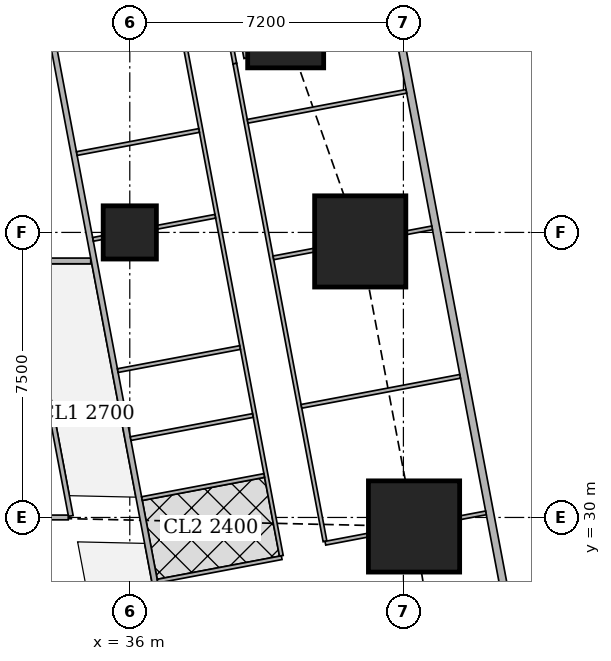
"""IFC4 building model, lengths in metres.
Left out: names, types, materials, properties, quantities, classifications, styles, units other than length and angle.
Written with IfcOpenShell. Run it as: python <this file> out.ifc"""

import sys

from ifc_helpers import new_model, si_unit, direction, frame, frame_2d, origin, origin_2d, place, context, subcontext, project, spatial, rectangle, extrude, element, fill, save


model = new_model("IFC4")
c1 = context("Model", 3, precision=1e-05, world=origin(), true_north=direction((0.0, 1.0)))
c2 = subcontext(c1, "Body", "Model", "MODEL_VIEW")
j1 = project(units=[si_unit("LENGTHUNIT", "METRE"), si_unit("PLANEANGLEUNIT", "RADIAN")], contexts=[c1])
p1 = place(None, origin())
s1 = spatial("IfcSite", under=j1, at=p1, CompositionType="ELEMENT")
p2 = place(p1, origin())
s2 = spatial("IfcBuilding", under=s1, at=p2, CompositionType="ELEMENT")
p3 = place(p2, frame((0.0, 0.0, 193.7)))
s3 = spatial("IfcBuildingStorey", under=s2, at=p3, CompositionType="ELEMENT", Elevation=193.7)
p4 = place(p3, frame((43.48, 29.763, 0.0), z_axis=(0.0, 0.0, 1.0), x_axis=(1.0, 0.0, 0.0)))
e1 = element("IfcColumn", 1, at=p4, inside=s3, PredefinedType="COLUMN", context=c2, shape_type="SweptSolid", body=[
    extrude(rectangle(XDim=2.4, YDim=2.4, at=origin_2d()), origin(), (0.0, 0.0, 1.0), 3.75),
])
p5 = place(p3, frame((36.0, 37.5, 0.0), z_axis=(0.0, 0.0, 1.0), x_axis=(1.0, 0.0, 0.0)))
e2 = element("IfcColumn", 2, at=p5, inside=s3, PredefinedType="COLUMN", context=c2, shape_type="SweptSolid", body=[
    extrude(rectangle(XDim=1.4, YDim=1.4, at=origin_2d()), origin(), (0.0, 0.0, 1.0), 3.75),
])
p6 = place(p3, frame((42.064, 37.263, 0.0), z_axis=(0.0, 0.0, 1.0), x_axis=(1.0, 0.0, 0.0)))
e3 = element("IfcColumn", 3, at=p6, inside=s3, PredefinedType="COLUMN", context=c2, shape_type="SweptSolid", body=[
    extrude(rectangle(XDim=2.4, YDim=2.4, at=origin_2d()), origin(), (0.0, 0.0, 1.0), 3.75),
])
p7 = place(p3, frame((40.102, 42.83, 0.0), z_axis=(0.0, 0.0, 1.0), x_axis=(1.0, 0.0, 0.0)))
e4 = element("IfcColumn", 4, at=p7, inside=s3, PredefinedType="COLUMN", context=c2, shape_type="SweptSolid", body=[
    extrude(rectangle(XDim=2.0, YDim=2.0, at=origin_2d()), origin(), (0.0, 0.0, 1.0), 3.75),
])
p8 = place(p3, frame((50.653, 2.703, 0.0), z_axis=(0.0, 0.0, 1.0), x_axis=(-0.185612026696, 0.982623109613, 0.0)))
e5 = element("IfcWall", 5, at=p8, inside=s3, PredefinedType="SOLIDWALL", context=c2, shape_type="SweptSolid", body=[
    extrude(rectangle(XDim=41.393, YDim=0.2, at=frame_2d((20.697, 0.0))), origin(), (0.0, 0.0, 1.0), 3.5),
])
p9 = place(p8, frame((1.633, 0.0, 0.9)))
e6 = element("IfcOpeningElement", 6, at=p9, cuts=e5, PredefinedType="OPENING", context=c2, shape_type="SweptSolid", body=[
    extrude(rectangle(XDim=1.8, YDim=1.5, at=frame_2d((0.9, 0.75))), frame((0.0, 0.11, 0.0), z_axis=(0.0, -1.0, 0.0), x_axis=(1.0, 0.0, 0.0)), (0.0, 0.0, 1.0), 0.22),
])
p10 = place(p8, frame((6.032, 0.0, 0.9)))
e7 = element("IfcOpeningElement", 7, at=p10, cuts=e5, PredefinedType="OPENING", context=c2, shape_type="SweptSolid", body=[
    extrude(rectangle(XDim=1.8, YDim=1.5, at=frame_2d((0.9, 0.75))), frame((0.0, 0.11, 0.0), z_axis=(0.0, -1.0, 0.0), x_axis=(1.0, 0.0, 0.0)), (0.0, 0.0, 1.0), 0.22),
])
p11 = place(p8, frame((9.848, 0.0, 0.9)))
e8 = element("IfcOpeningElement", 8, at=p11, cuts=e5, PredefinedType="OPENING", context=c2, shape_type="SweptSolid", body=[
    extrude(rectangle(XDim=1.8, YDim=1.5, at=frame_2d((0.9, 0.75))), frame((0.0, 0.11, 0.0), z_axis=(0.0, -1.0, 0.0), x_axis=(1.0, 0.0, 0.0)), (0.0, 0.0, 1.0), 0.22),
])
p12 = place(p8, frame((13.664, 0.0, 0.9)))
e9 = element("IfcOpeningElement", 9, at=p12, cuts=e5, PredefinedType="OPENING", context=c2, shape_type="SweptSolid", body=[
    extrude(rectangle(XDim=1.8, YDim=1.5, at=frame_2d((0.9, 0.75))), frame((0.0, 0.11, 0.0), z_axis=(0.0, -1.0, 0.0), x_axis=(1.0, 0.0, 0.0)), (0.0, 0.0, 1.0), 0.22),
])
p13 = place(p8, frame((17.481, 0.0, 0.9)))
e10 = element("IfcOpeningElement", 10, at=p13, cuts=e5, PredefinedType="OPENING", context=c2, shape_type="SweptSolid", body=[
    extrude(rectangle(XDim=1.8, YDim=1.5, at=frame_2d((0.9, 0.75))), frame((0.0, 0.11, 0.0), z_axis=(0.0, -1.0, 0.0), x_axis=(1.0, 0.0, 0.0)), (0.0, 0.0, 1.0), 0.22),
])
p14 = place(p8, frame((21.297, 0.0, 0.9)))
e11 = element("IfcOpeningElement", 11, at=p14, cuts=e5, PredefinedType="OPENING", context=c2, shape_type="SweptSolid", body=[
    extrude(rectangle(XDim=1.8, YDim=1.5, at=frame_2d((0.9, 0.75))), frame((0.0, 0.11, 0.0), z_axis=(0.0, -1.0, 0.0), x_axis=(1.0, 0.0, 0.0)), (0.0, 0.0, 1.0), 0.22),
])
p15 = place(p8, frame((25.113, 0.0, 0.9)))
e12 = element("IfcOpeningElement", 12, at=p15, cuts=e5, PredefinedType="OPENING", context=c2, shape_type="SweptSolid", body=[
    extrude(rectangle(XDim=1.8, YDim=1.5, at=frame_2d((0.9, 0.75))), frame((0.0, 0.11, 0.0), z_axis=(0.0, -1.0, 0.0), x_axis=(1.0, 0.0, 0.0)), (0.0, 0.0, 1.0), 0.22),
])
p16 = place(p8, frame((28.93, 0.0, 0.9)))
e13 = element("IfcOpeningElement", 13, at=p16, cuts=e5, PredefinedType="OPENING", context=c2, shape_type="SweptSolid", body=[
    extrude(rectangle(XDim=1.8, YDim=1.5, at=frame_2d((0.9, 0.75))), frame((0.0, 0.11, 0.0), z_axis=(0.0, -1.0, 0.0), x_axis=(1.0, 0.0, 0.0)), (0.0, 0.0, 1.0), 0.22),
])
p17 = place(p8, frame((32.746, 0.0, 0.9)))
e14 = element("IfcOpeningElement", 14, at=p17, cuts=e5, PredefinedType="OPENING", context=c2, shape_type="SweptSolid", body=[
    extrude(rectangle(XDim=1.8, YDim=1.5, at=frame_2d((0.9, 0.75))), frame((0.0, 0.11, 0.0), z_axis=(0.0, -1.0, 0.0), x_axis=(1.0, 0.0, 0.0)), (0.0, 0.0, 1.0), 0.22),
])
p18 = place(p8, frame((36.481, 0.0, 0.9)))
e15 = element("IfcOpeningElement", 15, at=p18, cuts=e5, PredefinedType="OPENING", context=c2, shape_type="SweptSolid", body=[
    extrude(rectangle(XDim=1.8, YDim=1.5, at=frame_2d((0.9, 0.75))), frame((0.0, 0.11, 0.0), z_axis=(0.0, -1.0, 0.0), x_axis=(1.0, 0.0, 0.0)), (0.0, 0.0, 1.0), 0.22),
])
p19 = place(p3, frame((29.501, 36.75, 0.0), z_axis=(0.0, 0.0, 1.0), x_axis=(1.0, 0.0, 0.0)))
e16 = element("IfcWall", 16, at=p19, inside=s3, PredefinedType="SOLIDWALL", context=c2, shape_type="SweptSolid", body=[
    extrude(rectangle(XDim=5.471, YDim=0.15, at=frame_2d((2.735, 0.0))), origin(), (0.0, 0.0, 1.0), 3.5),
])
p20 = place(p19, frame((2.945, 0.0, 0.0)))
e17 = element("IfcOpeningElement", 17, at=p20, cuts=e16, PredefinedType="OPENING", context=c2, shape_type="SweptSolid", body=[
    extrude(rectangle(XDim=1.0, YDim=2.1, at=frame_2d((0.5, 1.05))), frame((0.0, 0.085, 0.0), z_axis=(0.0, -1.0, 0.0), x_axis=(1.0, 0.0, 0.0)), (0.0, 0.0, 1.0), 0.17),
])
p21 = place(p3, frame((33.933, 42.73, 0.0), z_axis=(0.0, 0.0, 1.0), x_axis=(0.185595417643, -0.982626246825, 0.0)))
e18 = element("IfcWall", 18, at=p21, inside=s3, PredefinedType="SOLIDWALL", context=c2, shape_type="SweptSolid", body=[
    extrude(rectangle(XDim=41.051, YDim=0.15, at=frame_2d((20.525, 0.0))), origin(), (0.0, 0.0, 1.0), 2.5),
])
p22 = place(p21, frame((16.082, 0.0, 0.0)))
e19 = element("IfcOpeningElement", 19, at=p22, cuts=e18, PredefinedType="OPENING", context=c2, shape_type="SweptSolid", body=[
    extrude(rectangle(XDim=1.0, YDim=2.1, at=frame_2d((0.5, 1.05))), frame((0.0, 0.085, 0.0), z_axis=(0.0, -1.0, 0.0), x_axis=(1.0, 0.0, 0.0)), (0.0, 0.0, 1.0), 0.17),
])
p23 = place(p21, frame((19.898, 0.0, 0.0)))
e20 = element("IfcOpeningElement", 20, at=p23, cuts=e18, PredefinedType="OPENING", context=c2, shape_type="SweptSolid", body=[
    extrude(rectangle(XDim=1.0, YDim=2.1, at=frame_2d((0.5, 1.05))), frame((0.0, 0.085, 0.0), z_axis=(0.0, -1.0, 0.0), x_axis=(1.0, 0.0, 0.0)), (0.0, 0.0, 1.0), 0.17),
])
p24 = place(p21, frame((30.862, 0.0, 0.0)))
e21 = element("IfcOpeningElement", 21, at=p24, cuts=e18, PredefinedType="OPENING", context=c2, shape_type="SweptSolid", body=[
    extrude(rectangle(XDim=1.0, YDim=2.1, at=frame_2d((0.5, 1.05))), frame((0.0, 0.085, 0.0), z_axis=(0.0, -1.0, 0.0), x_axis=(1.0, 0.0, 0.0)), (0.0, 0.0, 1.0), 0.17),
])
p25 = place(p3, frame((39.054, 42.085, 0.0), z_axis=(0.0, 0.0, 1.0), x_axis=(-0.185791584218, 0.982589175207, 0.0)))
e22 = element("IfcWall", 22, at=p25, inside=s3, PredefinedType="PARTITIONING", context=c2, shape_type="SweptSolid", body=[
    extrude(rectangle(XDim=3.628, YDim=0.1, at=frame_2d((1.814, 0.0))), origin(), (0.0, 0.0, 1.0), 2.05),
])
p26 = place(p3, frame((38.256, 44.628, 0.0), z_axis=(0.0, 0.0, 1.0), x_axis=(0.185700639943, -0.982606366927, 0.0)))
e23 = element("IfcWall", 23, at=p26, inside=s3, PredefinedType="PARTITIONING", context=c2, shape_type="SweptSolid", body=[
    extrude(rectangle(XDim=2.735, YDim=0.1, at=frame_2d((1.367, 0.0))), origin(), (0.0, 0.0, 1.0), 2.05),
])
p27 = place(p3, frame((38.764, 41.941, 0.0), z_axis=(0.0, 0.0, 1.0), x_axis=(0.185512176227, -0.982641965556, 0.0)))
e24 = element("IfcWall", 24, at=p27, inside=s3, PredefinedType="PARTITIONING", context=c2, shape_type="SweptSolid", body=[
    extrude(rectangle(XDim=12.792, YDim=0.1, at=frame_2d((6.396, 0.0))), origin(), (0.0, 0.0, 1.0), 2.5),
])
p28 = place(p27, frame((11.35, 0.0, 0.0)))
e25 = element("IfcOpeningElement", 25, at=p28, cuts=e24, PredefinedType="OPENING", context=c2, shape_type="SweptSolid", body=[
    extrude(rectangle(XDim=0.9, YDim=2.1, at=frame_2d((0.45, 1.05))), frame((0.0, 0.06, 0.0), z_axis=(0.0, -1.0, 0.0), x_axis=(1.0, 0.0, 0.0)), (0.0, 0.0, 1.0), 0.12),
])
p29 = place(p27, frame((8.085, 0.0, 0.0)))
e26 = element("IfcOpeningElement", 26, at=p29, cuts=e24, PredefinedType="OPENING", context=c2, shape_type="SweptSolid", body=[
    extrude(rectangle(XDim=0.9, YDim=2.1, at=frame_2d((0.45, 1.05))), frame((0.0, 0.06, 0.0), z_axis=(0.0, -1.0, 0.0), x_axis=(1.0, 0.0, 0.0)), (0.0, 0.0, 1.0), 0.12),
])
p30 = place(p27, frame((3.7, 0.0, 0.0)))
e27 = element("IfcOpeningElement", 27, at=p30, cuts=e24, PredefinedType="OPENING", context=c2, shape_type="SweptSolid", body=[
    extrude(rectangle(XDim=0.9, YDim=2.1, at=frame_2d((0.45, 1.05))), frame((0.0, 0.06, 0.0), z_axis=(0.0, -1.0, 0.0), x_axis=(1.0, 0.0, 0.0)), (0.0, 0.0, 1.0), 0.12),
])
p31 = place(p3, frame((37.473, 42.309, 0.0), z_axis=(0.0, 0.0, 1.0), x_axis=(0.185570636839, -0.982630927024, 0.0)))
e28 = element("IfcWall", 28, at=p31, inside=s3, PredefinedType="PARTITIONING", context=c2, shape_type="SweptSolid", body=[
    extrude(rectangle(XDim=13.553, YDim=0.1, at=frame_2d((6.777, 0.0))), origin(), (0.0, 0.0, 1.0), 2.5),
])
p32 = place(p31, frame((12.049, 0.0, 0.0)))
e29 = element("IfcOpeningElement", 29, at=p32, cuts=e28, PredefinedType="OPENING", context=c2, shape_type="SweptSolid", body=[
    extrude(rectangle(XDim=0.9, YDim=2.1, at=frame_2d((0.45, 1.05))), frame((0.0, 0.06, 0.0), z_axis=(0.0, -1.0, 0.0), x_axis=(1.0, 0.0, 0.0)), (0.0, 0.0, 1.0), 0.12),
])
p33 = place(p31, frame((8.427, 0.0, 0.0)))
e30 = element("IfcOpeningElement", 30, at=p33, cuts=e28, PredefinedType="OPENING", context=c2, shape_type="SweptSolid", body=[
    extrude(rectangle(XDim=0.9, YDim=2.1, at=frame_2d((0.45, 1.05))), frame((0.0, 0.06, 0.0), z_axis=(0.0, -1.0, 0.0), x_axis=(1.0, 0.0, 0.0)), (0.0, 0.0, 1.0), 0.12),
])
p34 = place(p31, frame((2.853, 0.0, 0.0)))
e31 = element("IfcOpeningElement", 31, at=p34, cuts=e28, PredefinedType="OPENING", context=c2, shape_type="SweptSolid", body=[
    extrude(rectangle(XDim=0.9, YDim=2.1, at=frame_2d((0.45, 1.05))), frame((0.0, 0.06, 0.0), z_axis=(0.0, -1.0, 0.0), x_axis=(1.0, 0.0, 0.0)), (0.0, 0.0, 1.0), 0.12),
])
p35 = place(p31, frame((10.14, 0.0, 0.0)))
e32 = element("IfcOpeningElement", 32, at=p35, cuts=e28, PredefinedType="OPENING", context=c2, shape_type="SweptSolid", body=[
    extrude(rectangle(XDim=0.9, YDim=2.1, at=frame_2d((0.45, 1.05))), frame((0.0, 0.06, 0.0), z_axis=(0.0, -1.0, 0.0), x_axis=(1.0, 0.0, 0.0)), (0.0, 0.0, 1.0), 0.12),
])
p36 = place(p31, frame((5.759, 0.0, 0.0)))
e33 = element("IfcOpeningElement", 33, at=p36, cuts=e28, PredefinedType="OPENING", context=c2, shape_type="SweptSolid", body=[
    extrude(rectangle(XDim=0.9, YDim=2.1, at=frame_2d((0.45, 1.05))), frame((0.0, 0.06, 0.0), z_axis=(0.0, -1.0, 0.0), x_axis=(1.0, 0.0, 0.0)), (0.0, 0.0, 1.0), 0.12),
])
p37 = place(p3, frame((43.277, 41.212, 0.0), z_axis=(0.0, 0.0, 1.0), x_axis=(-0.982665405803, -0.185387972203, 0.0)))
e34 = element("IfcWall", 34, at=p37, inside=s3, PredefinedType="PARTITIONING", context=c2, shape_type="SweptSolid", body=[
    extrude(rectangle(XDim=4.25, YDim=0.1, at=frame_2d((2.125, 0.0))), origin(), (0.0, 0.0, 1.0), 2.05),
])
p38 = place(p3, frame((43.955, 37.62, 0.0), z_axis=(0.0, 0.0, 1.0), x_axis=(-0.982495415327, -0.186286765128, 0.0)))
e35 = element("IfcWall", 35, at=p38, inside=s3, PredefinedType="PARTITIONING", context=c2, shape_type="SweptSolid", body=[
    extrude(rectangle(XDim=0.693, YDim=0.1, at=frame_2d((0.347, 0.0))), origin(), (0.0, 0.0, 1.0), 3.5),
])
p39 = place(p3, frame((40.854, 37.034, 0.0), z_axis=(0.0, 0.0, 1.0), x_axis=(-0.982651678759, -0.185460718839, 0.0)))
e36 = element("IfcWall", 36, at=p39, inside=s3, PredefinedType="PARTITIONING", context=c2, shape_type="SweptSolid", body=[
    extrude(rectangle(XDim=1.094, YDim=0.1, at=frame_2d((0.547, 0.0))), origin(), (0.0, 0.0, 1.0), 3.5),
])
p40 = place(p3, frame((44.693, 33.713, 0.0), z_axis=(0.0, 0.0, 1.0), x_axis=(-0.982623519589, -0.185609856287, 0.0)))
e37 = element("IfcWall", 37, at=p40, inside=s3, PredefinedType="PARTITIONING", context=c2, shape_type="SweptSolid", body=[
    extrude(rectangle(XDim=4.25, YDim=0.1, at=frame_2d((2.125, 0.0))), origin(), (0.0, 0.0, 1.0), 2.05),
])
p41 = place(p3, frame((45.372, 30.121, 0.0), z_axis=(0.0, 0.0, 1.0), x_axis=(-0.98254419619, -0.186029305578, 0.0)))
e38 = element("IfcWall", 38, at=p41, inside=s3, PredefinedType="PARTITIONING", context=c2, shape_type="SweptSolid", body=[
    extrude(rectangle(XDim=0.694, YDim=0.1, at=frame_2d((0.347, 0.0))), origin(), (0.0, 0.0, 1.0), 3.5),
])
p42 = place(p3, frame((42.27, 29.535, 0.0), z_axis=(0.0, 0.0, 1.0), x_axis=(-0.982502700549, -0.186248338017, 0.0)))
e39 = element("IfcWall", 39, at=p42, inside=s3, PredefinedType="PARTITIONING", context=c2, shape_type="SweptSolid", body=[
    extrude(rectangle(XDim=1.143, YDim=0.1, at=frame_2d((0.572, 0.0))), origin(), (0.0, 0.0, 1.0), 2.5),
])
p43 = place(p3, frame((37.824, 40.182, 0.0), z_axis=(0.0, 0.0, 1.0), x_axis=(-0.982674977865, -0.185337227447, 0.0)))
e40 = element("IfcWall", 40, at=p43, inside=s3, PredefinedType="PARTITIONING", context=c2, shape_type="SweptSolid", body=[
    extrude(rectangle(XDim=3.275, YDim=0.1, at=frame_2d((1.637, 0.0))), origin(), (0.0, 0.0, 1.0), 3.5),
])
p44 = place(p3, frame((38.25, 37.925, 0.0), z_axis=(0.0, 0.0, 1.0), x_axis=(-0.982610209589, -0.185680305934, 0.0)))
e41 = element("IfcWall", 41, at=p44, inside=s3, PredefinedType="PARTITIONING", context=c2, shape_type="SweptSolid", body=[
    extrude(rectangle(XDim=1.567, YDim=0.1, at=frame_2d((0.784, 0.0))), origin(), (0.0, 0.0, 1.0), 3.5),
])
p45 = place(p3, frame((35.29, 37.366, 0.0), z_axis=(0.0, 0.0, 1.0), x_axis=(-0.982395465615, -0.18681313963, 0.0)))
e42 = element("IfcWall", 42, at=p45, inside=s3, PredefinedType="PARTITIONING", context=c2, shape_type="SweptSolid", body=[
    extrude(rectangle(XDim=0.263, YDim=0.1, at=frame_2d((0.131, 0.0))), origin(), (0.0, 0.0, 1.0), 3.5),
])
p46 = place(p3, frame((39.24, 32.683, 0.0), z_axis=(0.0, 0.0, 1.0), x_axis=(-0.982607026909, -0.185697147715, 0.0)))
e43 = element("IfcWall", 43, at=p46, inside=s3, PredefinedType="PARTITIONING", context=c2, shape_type="SweptSolid", body=[
    extrude(rectangle(XDim=3.275, YDim=0.1, at=frame_2d((1.637, 0.0))), origin(), (0.0, 0.0, 1.0), 3.5),
])
p47 = place(p3, frame((39.997, 28.942, 0.0), z_axis=(0.0, 0.0, 1.0), x_axis=(-0.982569883123, -0.185893584556, 0.0)))
e44 = element("IfcWall", 44, at=p47, inside=s3, PredefinedType="PARTITIONING", context=c2, shape_type="SweptSolid", body=[
    extrude(rectangle(XDim=3.324, YDim=0.1, at=frame_2d((1.662, 0.0))), origin(), (0.0, 0.0, 1.0), 3.5),
])
p48 = place(p3, frame((39.538, 31.104, 0.0), z_axis=(0.0, 0.0, 1.0), x_axis=(-0.982620626894, -0.185625169636, 0.0)))
e45 = element("IfcWall", 45, at=p48, inside=s3, PredefinedType="PARTITIONING", context=c2, shape_type="SweptSolid", body=[
    extrude(rectangle(XDim=3.275, YDim=0.1, at=frame_2d((1.637, 0.0))), origin(), (0.0, 0.0, 1.0), 2.5),
])
p49 = place(p3, frame((38.902, 34.471, 0.0), z_axis=(0.0, 0.0, 1.0), x_axis=(-0.982674977865, -0.185337227447, 0.0)))
e46 = element("IfcWall", 46, at=p49, inside=s3, PredefinedType="PARTITIONING", context=c2, shape_type="SweptSolid", body=[
    extrude(rectangle(XDim=3.275, YDim=0.1, at=frame_2d((1.637, 0.0))), origin(), (0.0, 0.0, 1.0), 3.5),
])
p50 = place(p3, frame((34.448, 30.04, 0.0), z_axis=(0.0, 0.0, 1.0), x_axis=(-0.185749459238, 0.982597139418, 0.0)))
e47 = element("IfcWall", 47, at=p50, inside=s3, PredefinedType="PARTITIONING", context=c2, shape_type="SweptSolid", body=[
    extrude(rectangle(XDim=4.883, YDim=0.125, at=frame_2d((2.441, 0.0))), origin(), (0.0, 0.0, 1.0), 2.5),
])
p51 = place(p50, frame((0.95, 0.0, 0.0)))
e48 = element("IfcOpeningElement", 48, at=p51, cuts=e47, PredefinedType="OPENING", context=c2, shape_type="SweptSolid", body=[
    extrude(rectangle(XDim=1.0, YDim=2.1, at=frame_2d((0.5, 1.05))), frame((0.0, 0.073, 0.0), z_axis=(0.0, -1.0, 0.0), x_axis=(1.0, 0.0, 0.0)), (0.0, 0.0, 1.0), 0.145),
])
p52 = place(p3, frame((34.535, 22.574, 0.0), z_axis=(0.0, 0.0, 1.0), x_axis=(-0.185576487128, 0.982629822174, 0.0)))
e49 = element("IfcWall", 49, at=p52, inside=s3, PredefinedType="PARTITIONING", context=c2, shape_type="SweptSolid", body=[
    extrude(rectangle(XDim=6.832, YDim=0.125, at=frame_2d((3.416, 0.0))), origin(), (0.0, 0.0, 1.0), 2.5),
])
p53 = place(p52, frame((3.241, 0.0, 0.0)))
e50 = element("IfcOpeningElement", 50, at=p53, cuts=e49, PredefinedType="OPENING", context=c2, shape_type="SweptSolid", body=[
    extrude(rectangle(XDim=1.0, YDim=2.1, at=frame_2d((0.5, 1.05))), frame((0.0, 0.073, 0.0), z_axis=(0.0, -1.0, 0.0), x_axis=(1.0, 0.0, 0.0)), (0.0, 0.0, 1.0), 0.145),
])
p54 = place(p3, frame((33.701, 30.0, 0.0), z_axis=(0.0, 0.0, 1.0), x_axis=(1.0, 0.0, 0.0)))
e51 = element("IfcWall", 51, at=p54, inside=s3, PredefinedType="PARTITIONING", context=c2, shape_type="SweptSolid", body=[
    extrude(rectangle(XDim=0.679, YDim=0.125, at=frame_2d((0.339, 0.0))), origin(), (0.0, 0.0, 1.0), 2.5),
])
p55 = place(p15, origin())
e52 = element("IfcWindow", 52, at=p55, inside=s3, PartitioningType="SINGLE_PANEL", PredefinedType="WINDOW", context=c2, shape_type="SweptSolid", body=[
    extrude(rectangle(XDim=1.8, YDim=1.5, at=frame_2d((0.9, 0.75))), frame((0.0, 0.03, 0.0), z_axis=(0.0, -1.0, 0.0), x_axis=(1.0, 0.0, 0.0)), (0.0, 0.0, 1.0), 0.06),
])
fill(e12, e52)
p56 = place(p16, origin())
e53 = element("IfcWindow", 53, at=p56, inside=s3, PartitioningType="SINGLE_PANEL", PredefinedType="WINDOW", context=c2, shape_type="SweptSolid", body=[
    extrude(rectangle(XDim=1.8, YDim=1.5, at=frame_2d((0.9, 0.75))), frame((0.0, 0.03, 0.0), z_axis=(0.0, -1.0, 0.0), x_axis=(1.0, 0.0, 0.0)), (0.0, 0.0, 1.0), 0.06),
])
fill(e13, e53)
p57 = place(p17, origin())
e54 = element("IfcWindow", 54, at=p57, inside=s3, PartitioningType="SINGLE_PANEL", PredefinedType="WINDOW", context=c2, shape_type="SweptSolid", body=[
    extrude(rectangle(XDim=1.8, YDim=1.5, at=frame_2d((0.9, 0.75))), frame((0.0, 0.03, 0.0), z_axis=(0.0, -1.0, 0.0), x_axis=(1.0, 0.0, 0.0)), (0.0, 0.0, 1.0), 0.06),
])
fill(e14, e54)
p58 = place(p18, origin())
e55 = element("IfcWindow", 55, at=p58, inside=s3, PartitioningType="SINGLE_PANEL", PredefinedType="WINDOW", context=c2, shape_type="SweptSolid", body=[
    extrude(rectangle(XDim=1.8, YDim=1.5, at=frame_2d((0.9, 0.75))), frame((0.0, 0.03, 0.0), z_axis=(0.0, -1.0, 0.0), x_axis=(1.0, 0.0, 0.0)), (0.0, 0.0, 1.0), 0.06),
])
fill(e15, e55)
p59 = place(p28, origin())
e56 = element("IfcDoor", 56, at=p59, inside=s3, OperationType="SINGLE_SWING_RIGHT", PredefinedType="DOOR", context=c2, shape_type="SweptSolid", body=[
    extrude(rectangle(XDim=0.9, YDim=2.1, at=frame_2d((0.45, 1.05))), frame((0.0, 0.025, 0.0), z_axis=(0.0, -1.0, 0.0), x_axis=(1.0, 0.0, 0.0)), (0.0, 0.0, 1.0), 0.05),
])
fill(e25, e56)
p60 = place(p29, origin())
e57 = element("IfcDoor", 57, at=p60, inside=s3, OperationType="SINGLE_SWING_RIGHT", PredefinedType="DOOR", context=c2, shape_type="SweptSolid", body=[
    extrude(rectangle(XDim=0.9, YDim=2.1, at=frame_2d((0.45, 1.05))), frame((0.0, 0.025, 0.0), z_axis=(0.0, -1.0, 0.0), x_axis=(1.0, 0.0, 0.0)), (0.0, 0.0, 1.0), 0.05),
])
fill(e26, e57)
p61 = place(p30, origin())
e58 = element("IfcDoor", 58, at=p61, inside=s3, OperationType="SINGLE_SWING_RIGHT", PredefinedType="DOOR", context=c2, shape_type="SweptSolid", body=[
    extrude(rectangle(XDim=0.9, YDim=2.1, at=frame_2d((0.45, 1.05))), frame((0.0, 0.025, 0.0), z_axis=(0.0, -1.0, 0.0), x_axis=(1.0, 0.0, 0.0)), (0.0, 0.0, 1.0), 0.05),
])
fill(e27, e58)
p62 = place(p32, origin())
e59 = element("IfcDoor", 59, at=p62, inside=s3, OperationType="SINGLE_SWING_LEFT", PredefinedType="DOOR", context=c2, shape_type="SweptSolid", body=[
    extrude(rectangle(XDim=0.9, YDim=2.1, at=frame_2d((0.45, 1.05))), frame((0.0, 0.025, 0.0), z_axis=(0.0, -1.0, 0.0), x_axis=(1.0, 0.0, 0.0)), (0.0, 0.0, 1.0), 0.05),
])
fill(e29, e59)
p63 = place(p33, origin())
e60 = element("IfcDoor", 60, at=p63, inside=s3, OperationType="SINGLE_SWING_RIGHT", PredefinedType="DOOR", context=c2, shape_type="SweptSolid", body=[
    extrude(rectangle(XDim=0.9, YDim=2.1, at=frame_2d((0.45, 1.05))), frame((0.0, 0.025, 0.0), z_axis=(0.0, -1.0, 0.0), x_axis=(1.0, 0.0, 0.0)), (0.0, 0.0, 1.0), 0.05),
])
fill(e30, e60)
p64 = place(p34, origin())
e61 = element("IfcDoor", 61, at=p64, inside=s3, OperationType="SINGLE_SWING_RIGHT", PredefinedType="DOOR", context=c2, shape_type="SweptSolid", body=[
    extrude(rectangle(XDim=0.9, YDim=2.1, at=frame_2d((0.45, 1.05))), frame((0.0, 0.025, 0.0), z_axis=(0.0, -1.0, 0.0), x_axis=(1.0, 0.0, 0.0)), (0.0, 0.0, 1.0), 0.05),
])
fill(e31, e61)
p65 = place(p35, origin())
e62 = element("IfcDoor", 62, at=p65, inside=s3, OperationType="SINGLE_SWING_LEFT", PredefinedType="DOOR", context=c2, shape_type="SweptSolid", body=[
    extrude(rectangle(XDim=0.9, YDim=2.1, at=frame_2d((0.45, 1.05))), frame((0.0, 0.025, 0.0), z_axis=(0.0, -1.0, 0.0), x_axis=(1.0, 0.0, 0.0)), (0.0, 0.0, 1.0), 0.05),
])
fill(e32, e62)
p66 = place(p36, origin())
e63 = element("IfcDoor", 63, at=p66, inside=s3, OperationType="SINGLE_SWING_LEFT", PredefinedType="DOOR", context=c2, shape_type="SweptSolid", body=[
    extrude(rectangle(XDim=0.9, YDim=2.1, at=frame_2d((0.45, 1.05))), frame((0.0, 0.025, 0.0), z_axis=(0.0, -1.0, 0.0), x_axis=(1.0, 0.0, 0.0)), (0.0, 0.0, 1.0), 0.05),
])
fill(e33, e63)
p67 = place(p51, origin())
e64 = element("IfcDoor", 64, at=p67, inside=s3, OperationType="SINGLE_SWING_LEFT", PredefinedType="DOOR", context=c2, shape_type="SweptSolid", body=[
    extrude(rectangle(XDim=1.0, YDim=2.1, at=frame_2d((0.5, 1.05))), frame((0.0, 0.025, 0.0), z_axis=(0.0, -1.0, 0.0), x_axis=(1.0, 0.0, 0.0)), (0.0, 0.0, 1.0), 0.05),
])
fill(e48, e64)
save(model, sys.argv[1])
